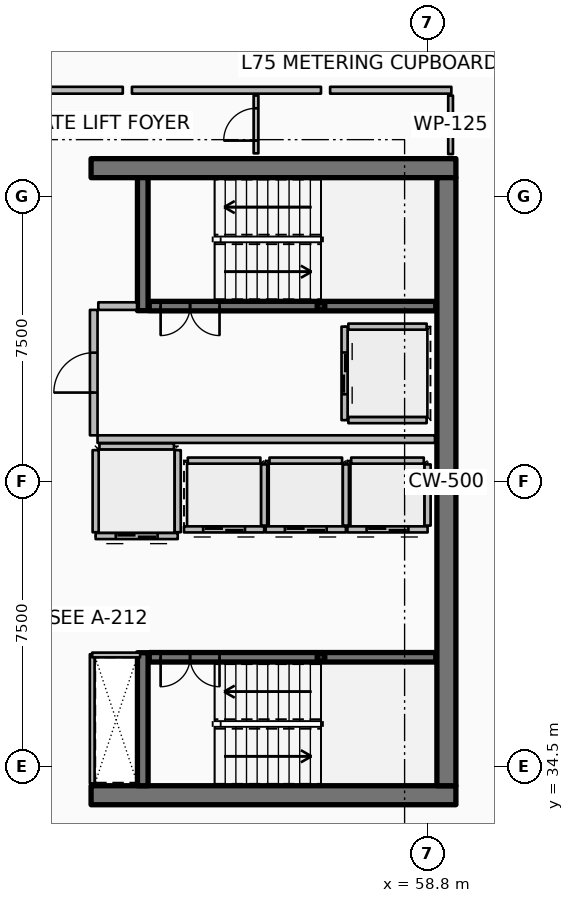
"""IFC4 building model, lengths in metres.
Left out: names, types, materials, properties, quantities, classifications, styles, units other than length and angle.
Written with IfcOpenShell. Run it as: python <this file> out.ifc"""

import sys

from ifc_helpers import new_model, si_unit, direction, frame, frame_2d, origin, origin_2d, place, context, subcontext, project, spatial, rectangle, hollow_rectangle, extrude, element, fill, save


model = new_model("IFC4")
c1 = context("Model", 3, precision=1e-05, world=origin(), true_north=direction((0.0, 1.0)))
c2 = subcontext(c1, "Body", "Model", "MODEL_VIEW")
j1 = project(units=[si_unit("LENGTHUNIT", "METRE"), si_unit("PLANEANGLEUNIT", "RADIAN")], contexts=[c1])
p1 = place(None, origin())
s1 = spatial("IfcSite", under=j1, at=p1, CompositionType="ELEMENT")
p2 = place(p1, origin())
s2 = spatial("IfcBuilding", under=s1, at=p2, CompositionType="ELEMENT")
p3 = place(p2, frame((0.0, 0.0, 298.3)))
s3 = spatial("IfcBuildingStorey", under=s2, at=p3, CompositionType="ELEMENT", Elevation=298.3)
for number, where, z_axis, x_axis in (
    (1, (49.95, 33.75, 0.0), (0.0, 0.0, 1.0), (1.0, 0.0, 0.0)),
    (2, (49.95, 50.25, 0.0), (0.0, 0.0, 1.0), (1.0, 0.0, 0.0)),
):
    element("IfcWall", number, at=place(p3, frame(where, z_axis=z_axis, x_axis=x_axis)), inside=s3, PredefinedType="SHEAR", context=c2, shape_type="SweptSolid", body=[
        extrude(rectangle(XDim=9.6, YDim=0.5, at=frame_2d((4.8, 0.0))), origin(), (0.0, 0.0, 1.0), 3.85),
    ])
p4 = place(p3, frame((59.3, 34.0, 0.0), z_axis=(0.0, 0.0, 1.0), x_axis=(0.0, 1.0, 0.0)))
e3 = element("IfcWall", 3, at=p4, inside=s3, PredefinedType="SHEAR", context=c2, shape_type="SweptSolid", body=[
    extrude(rectangle(XDim=16.0, YDim=0.5, at=frame_2d((8.0, 0.0))), origin(), (0.0, 0.0, 1.0), 3.85),
])
for number, where, z_axis, x_axis in (
    (4, (51.31, 46.5, 0.0), (0.0, 0.0, 1.0), (0.0, 1.0, 0.0)),
    (5, (51.31, 34.0, 0.0), (0.0, 0.0, 1.0), (0.0, 1.0, 0.0)),
):
    element("IfcWall", number, at=place(p3, frame(where, z_axis=z_axis, x_axis=x_axis)), inside=s3, PredefinedType="SHEAR", context=c2, shape_type="SweptSolid", body=[
        extrude(rectangle(XDim=3.5, YDim=0.28, at=frame_2d((1.75, 0.0))), origin(), (0.0, 0.0, 1.0), 3.85),
    ])
for number, where, z_axis, x_axis in (
    (6, (56.0, 46.62, 0.0), (0.0, 0.0, 1.0), (1.0, 0.0, 0.0)),
    (7, (56.0, 37.38, 0.0), (0.0, 0.0, 1.0), (1.0, 0.0, 0.0)),
):
    element("IfcColumn", number, at=place(p3, frame(where, z_axis=z_axis, x_axis=x_axis)), inside=s3, PredefinedType="COLUMN", context=c2, shape_type="SweptSolid", body=[
        extrude(hollow_rectangle(XDim=0.2, YDim=0.2, WallThickness=0.01, InnerFilletRadius=0.01, OuterFilletRadius=0.02, at=origin_2d()), origin(), (0.0, 0.0, 1.0), 1.72),
    ])
p5 = place(p3, frame((51.48, 46.62, 0.0), z_axis=(0.0, 0.0, 1.0), x_axis=(1.0, 0.0, 0.0)))
e8 = element("IfcWall", 8, at=p5, inside=s3, PredefinedType="SOLIDWALL", context=c2, shape_type="SweptSolid", body=[
    extrude(rectangle(XDim=7.54, YDim=0.25, at=frame_2d((3.77, 0.0))), origin(), (0.0, 0.0, 1.0), 3.59),
])
p6 = place(p5, frame((0.3, 0.0, 0.0)))
e9 = element("IfcOpeningElement", 9, at=p6, cuts=e8, PredefinedType="OPENING", context=c2, shape_type="SweptSolid", body=[
    extrude(rectangle(XDim=1.55, YDim=2.15, at=frame_2d((0.775, 1.075))), frame((0.0, 0.135, 0.0), z_axis=(0.0, -1.0, 0.0), x_axis=(1.0, 0.0, 0.0)), (0.0, 0.0, 1.0), 0.27),
])
p7 = place(p3, frame((51.48, 37.38, 0.0), z_axis=(0.0, 0.0, 1.0), x_axis=(1.0, 0.0, 0.0)))
e10 = element("IfcWall", 10, at=p7, inside=s3, PredefinedType="SOLIDWALL", context=c2, shape_type="SweptSolid", body=[
    extrude(rectangle(XDim=7.54, YDim=0.25, at=frame_2d((3.77, 0.0))), origin(), (0.0, 0.0, 1.0), 3.59),
])
p8 = place(p7, frame((0.3, 0.0, 0.0)))
e11 = element("IfcOpeningElement", 11, at=p8, cuts=e10, PredefinedType="OPENING", context=c2, shape_type="SweptSolid", body=[
    extrude(rectangle(XDim=1.55, YDim=2.15, at=frame_2d((0.775, 1.075))), frame((0.0, 0.135, 0.0), z_axis=(0.0, -1.0, 0.0), x_axis=(1.0, 0.0, 0.0)), (0.0, 0.0, 1.0), 0.27),
])
p9 = place(p3, frame((54.505, 40.745, 0.0), z_axis=(0.0, 0.0, 1.0), x_axis=(-1.0, 0.0, 0.0)))
e12 = element("IfcWall", 12, at=p9, inside=s3, PredefinedType="PARTITIONING", context=c2, shape_type="SweptSolid", body=[
    extrude(rectangle(XDim=2.11, YDim=0.16, at=frame_2d((1.055, 0.0))), origin(), (0.0, 0.0, 1.0), 3.59),
])
p10 = place(p9, frame((0.505, 0.0, 0.0)))
e13 = element("IfcOpeningElement", 13, at=p10, cuts=e12, PredefinedType="OPENING", context=c2, shape_type="SweptSolid", body=[
    extrude(rectangle(XDim=1.1, YDim=2.1, at=frame_2d((0.55, 1.05))), frame((0.0, 0.09, 0.0), z_axis=(0.0, -1.0, 0.0), x_axis=(1.0, 0.0, 0.0)), (0.0, 0.0, 1.0), 0.18),
])
p11 = place(p3, frame((54.505, 40.845, 0.0), z_axis=(0.0, 0.0, 1.0), x_axis=(0.0, 1.0, 0.0)))
e14 = element("IfcWall", 14, at=p11, inside=s3, PredefinedType="PARTITIONING", context=c2, shape_type="SweptSolid", body=[
    extrude(rectangle(XDim=1.61, YDim=0.16, at=frame_2d((0.805, 0.0))), origin(), (0.0, 0.0, 1.0), 3.59),
])
p12 = place(p3, frame((52.495, 42.555, 0.0), z_axis=(0.0, 0.0, 1.0), x_axis=(1.0, 0.0, 0.0)))
e15 = element("IfcWall", 15, at=p12, inside=s3, PredefinedType="PARTITIONING", context=c2, shape_type="SweptSolid", body=[
    extrude(rectangle(XDim=1.91, YDim=0.16, at=frame_2d((0.955, 0.0))), origin(), (0.0, 0.0, 1.0), 3.59),
])
p13 = place(p3, frame((56.655, 40.745, 0.0), z_axis=(0.0, 0.0, 1.0), x_axis=(-1.0, 0.0, 0.0)))
e16 = element("IfcWall", 16, at=p13, inside=s3, PredefinedType="PARTITIONING", context=c2, shape_type="SweptSolid", body=[
    extrude(rectangle(XDim=2.11, YDim=0.16, at=frame_2d((1.055, 0.0))), origin(), (0.0, 0.0, 1.0), 3.59),
])
p14 = place(p13, frame((0.505, 0.0, 0.0)))
e17 = element("IfcOpeningElement", 17, at=p14, cuts=e16, PredefinedType="OPENING", context=c2, shape_type="SweptSolid", body=[
    extrude(rectangle(XDim=1.1, YDim=2.1, at=frame_2d((0.55, 1.05))), frame((0.0, 0.09, 0.0), z_axis=(0.0, -1.0, 0.0), x_axis=(1.0, 0.0, 0.0)), (0.0, 0.0, 1.0), 0.18),
])
p15 = place(p3, frame((56.655, 40.845, 0.0), z_axis=(0.0, 0.0, 1.0), x_axis=(0.0, 1.0, 0.0)))
e18 = element("IfcWall", 18, at=p15, inside=s3, PredefinedType="PARTITIONING", context=c2, shape_type="SweptSolid", body=[
    extrude(rectangle(XDim=1.61, YDim=0.16, at=frame_2d((0.805, 0.0))), origin(), (0.0, 0.0, 1.0), 3.59),
])
p16 = place(p3, frame((54.645, 42.555, 0.0), z_axis=(0.0, 0.0, 1.0), x_axis=(1.0, 0.0, 0.0)))
e19 = element("IfcWall", 19, at=p16, inside=s3, PredefinedType="PARTITIONING", context=c2, shape_type="SweptSolid", body=[
    extrude(rectangle(XDim=1.91, YDim=0.16, at=frame_2d((0.955, 0.0))), origin(), (0.0, 0.0, 1.0), 3.59),
])
p17 = place(p3, frame((58.805, 40.745, 0.0), z_axis=(0.0, 0.0, 1.0), x_axis=(-1.0, 0.0, 0.0)))
e20 = element("IfcWall", 20, at=p17, inside=s3, PredefinedType="PARTITIONING", context=c2, shape_type="SweptSolid", body=[
    extrude(rectangle(XDim=2.11, YDim=0.16, at=frame_2d((1.055, 0.0))), origin(), (0.0, 0.0, 1.0), 3.59),
])
p18 = place(p17, frame((0.505, 0.0, 0.0)))
e21 = element("IfcOpeningElement", 21, at=p18, cuts=e20, PredefinedType="OPENING", context=c2, shape_type="SweptSolid", body=[
    extrude(rectangle(XDim=1.1, YDim=2.1, at=frame_2d((0.55, 1.05))), frame((0.0, 0.09, 0.0), z_axis=(0.0, -1.0, 0.0), x_axis=(1.0, 0.0, 0.0)), (0.0, 0.0, 1.0), 0.18),
])
p19 = place(p3, frame((58.805, 40.845, 0.0), z_axis=(0.0, 0.0, 1.0), x_axis=(0.0, 1.0, 0.0)))
e22 = element("IfcWall", 22, at=p19, inside=s3, PredefinedType="PARTITIONING", context=c2, shape_type="SweptSolid", body=[
    extrude(rectangle(XDim=1.61, YDim=0.16, at=frame_2d((0.805, 0.0))), origin(), (0.0, 0.0, 1.0), 3.59),
])
p20 = place(p3, frame((56.795, 42.555, 0.0), z_axis=(0.0, 0.0, 1.0), x_axis=(1.0, 0.0, 0.0)))
e23 = element("IfcWall", 23, at=p20, inside=s3, PredefinedType="PARTITIONING", context=c2, shape_type="SweptSolid", body=[
    extrude(rectangle(XDim=1.91, YDim=0.16, at=frame_2d((0.955, 0.0))), origin(), (0.0, 0.0, 1.0), 3.59),
])
p21 = place(p3, frame((56.62, 46.08, 0.0), z_axis=(0.0, 0.0, 1.0), x_axis=(0.0, -1.0, 0.0)))
e24 = element("IfcWall", 24, at=p21, inside=s3, PredefinedType="PARTITIONING", context=c2, shape_type="SweptSolid", body=[
    extrude(rectangle(XDim=2.46, YDim=0.16, at=frame_2d((1.23, 0.0))), origin(), (0.0, 0.0, 1.0), 3.59),
])
p22 = place(p21, frame((0.68, 0.0, 0.0)))
e25 = element("IfcOpeningElement", 25, at=p22, cuts=e24, PredefinedType="OPENING", context=c2, shape_type="SweptSolid", body=[
    extrude(rectangle(XDim=1.1, YDim=2.1, at=frame_2d((0.55, 1.05))), frame((0.0, 0.09, 0.0), z_axis=(0.0, -1.0, 0.0), x_axis=(1.0, 0.0, 0.0)), (0.0, 0.0, 1.0), 0.18),
])
for number, where, z_axis, x_axis in (
    (26, (56.72, 46.08, 0.0), (0.0, 0.0, 1.0), (1.0, 0.0, 0.0)),
    (27, (56.72, 43.62, 0.0), (0.0, 0.0, 1.0), (1.0, 0.0, 0.0)),
):
    element("IfcWall", number, at=place(p3, frame(where, z_axis=z_axis, x_axis=x_axis)), inside=s3, PredefinedType="PARTITIONING", context=c2, shape_type="SweptSolid", body=[
        extrude(rectangle(XDim=2.06, YDim=0.16, at=frame_2d((1.03, 0.0))), origin(), (0.0, 0.0, 1.0), 3.59),
    ])
p23 = place(p3, frame((52.23, 40.57, 0.0), z_axis=(0.0, 0.0, 1.0), x_axis=(-1.0, 0.0, 0.0)))
e28 = element("IfcWall", 28, at=p23, inside=s3, PredefinedType="PARTITIONING", context=c2, shape_type="SweptSolid", body=[
    extrude(rectangle(XDim=2.16, YDim=0.16, at=frame_2d((1.08, 0.0))), origin(), (0.0, 0.0, 1.0), 3.59),
])
p24 = place(p23, frame((0.53, 0.0, 0.0)))
e29 = element("IfcOpeningElement", 29, at=p24, cuts=e28, PredefinedType="OPENING", context=c2, shape_type="SweptSolid", body=[
    extrude(rectangle(XDim=1.1, YDim=2.1, at=frame_2d((0.55, 1.05))), frame((0.0, 0.09, 0.0), z_axis=(0.0, -1.0, 0.0), x_axis=(1.0, 0.0, 0.0)), (0.0, 0.0, 1.0), 0.18),
])
for number, where, z_axis, x_axis in (
    (30, (52.23, 40.67, 0.0), (0.0, 0.0, 1.0), (0.0, 1.0, 0.0)),
    (31, (50.07, 40.67, 0.0), (0.0, 0.0, 1.0), (0.0, 1.0, 0.0)),
):
    element("IfcWall", number, at=place(p3, frame(where, z_axis=z_axis, x_axis=x_axis)), inside=s3, PredefinedType="PARTITIONING", context=c2, shape_type="SweptSolid", body=[
        extrude(rectangle(XDim=2.16, YDim=0.16, at=frame_2d((1.08, 0.0))), origin(), (0.0, 0.0, 1.0), 3.59),
    ])
p25 = place(p3, frame((50.17, 42.93, 0.0), z_axis=(0.0, 0.0, 1.0), x_axis=(1.0, 0.0, 0.0)))
e32 = element("IfcWall", 32, at=p25, inside=s3, PredefinedType="PARTITIONING", context=c2, shape_type="SweptSolid", body=[
    extrude(rectangle(XDim=1.96, YDim=0.16, at=frame_2d((0.98, 0.0))), origin(), (0.0, 0.0, 1.0), 3.59),
])
p26 = place(p3, frame((50.12, 43.12, 0.0), z_axis=(0.0, 0.0, 1.0), x_axis=(1.0, 0.0, 0.0)))
e33 = element("IfcWall", 33, at=p26, inside=s3, PredefinedType="PARTITIONING", context=c2, shape_type="SweptSolid", body=[
    extrude(rectangle(XDim=8.88, YDim=0.2, at=frame_2d((4.44, 0.0))), origin(), (0.0, 0.0, 1.0), 3.59),
])
p27 = place(p3, frame((50.14, 46.62, 0.0), z_axis=(0.0, 0.0, 1.0), x_axis=(1.0, 0.0, 0.0)))
e34 = element("IfcWall", 34, at=p27, inside=s3, PredefinedType="PARTITIONING", context=c2, shape_type="SweptSolid", body=[
    extrude(rectangle(XDim=1.02, YDim=0.2, at=frame_2d((0.51, 0.0))), origin(), (0.0, 0.0, 1.0), 3.59),
])
p28 = place(p3, frame((50.02, 43.22, 0.0), z_axis=(0.0, 0.0, 1.0), x_axis=(0.0, 1.0, 0.0)))
e35 = element("IfcWall", 35, at=p28, inside=s3, PredefinedType="PARTITIONING", context=c2, shape_type="SweptSolid", body=[
    extrude(rectangle(XDim=3.3, YDim=0.2, at=frame_2d((1.65, 0.0))), origin(), (0.0, 0.0, 1.0), 3.59),
])
p29 = place(p28, frame((1.125, 0.0, 0.0)))
e36 = element("IfcOpeningElement", 36, at=p29, cuts=e35, PredefinedType="OPENING", context=c2, shape_type="SweptSolid", body=[
    extrude(rectangle(XDim=1.05, YDim=2.1, at=frame_2d((0.525, 1.05))), frame((0.0, 0.11, 0.0), z_axis=(0.0, -1.0, 0.0), x_axis=(1.0, 0.0, 0.0)), (0.0, 0.0, 1.0), 0.22),
])
p30 = place(p3, frame((49.98, 34.06, 0.0), z_axis=(0.0, 0.0, 1.0), x_axis=(0.0, 1.0, 0.0)))
e37 = element("IfcWall", 37, at=p30, inside=s3, PredefinedType="PARTITIONING", context=c2, shape_type="SweptSolid", body=[
    extrude(rectangle(XDim=3.4, YDim=0.125, at=frame_2d((1.7, 0.0))), origin(), (0.0, 0.0, 1.0), 3.03),
])
p31 = place(p3, frame((49.98, 37.44, 0.0), z_axis=(0.0, 0.0, 1.0), x_axis=(1.0, 0.0, 0.0)))
e38 = element("IfcWall", 38, at=p31, inside=s3, PredefinedType="PARTITIONING", context=c2, shape_type="SweptSolid", body=[
    extrude(rectangle(XDim=1.26, YDim=0.125, at=frame_2d((0.63, 0.0))), origin(), (0.0, 0.0, 1.0), 3.03),
])
p32 = place(p3, frame((59.41, 50.62, 0.0), z_axis=(0.0, 0.0, 1.0), x_axis=(0.0, 1.0, 0.0)))
e39 = element("IfcWall", 39, at=p32, inside=s3, PredefinedType="PARTITIONING", context=c2, shape_type="SweptSolid", body=[
    extrude(rectangle(XDim=1.54, YDim=0.125, at=frame_2d((0.77, 0.0))), origin(), (0.0, 0.0, 1.0), 3.03),
])
p33 = place(p3, frame((54.29, 50.64, 0.0), z_axis=(0.0, 0.0, 1.0), x_axis=(0.0, 1.0, 0.0)))
e40 = element("IfcWall", 40, at=p33, inside=s3, PredefinedType="PARTITIONING", context=c2, shape_type="SweptSolid", body=[
    extrude(rectangle(XDim=1.52, YDim=0.125, at=frame_2d((0.76, 0.0))), origin(), (0.0, 0.0, 1.0), 3.03),
])
p34 = place(p33, frame((0.335, 0.0, 0.0)))
e41 = element("IfcOpeningElement", 41, at=p34, cuts=e40, PredefinedType="OPENING", context=c2, shape_type="SweptSolid", body=[
    extrude(rectangle(XDim=0.85, YDim=2.06, at=frame_2d((0.425, 1.03))), frame((0.0, 0.073, 0.0), z_axis=(0.0, -1.0, 0.0), x_axis=(1.0, 0.0, 0.0)), (0.0, 0.0, 1.0), 0.145),
])
p35 = place(p3, frame((59.43, 52.3, 0.0), z_axis=(0.0, 0.0, 1.0), x_axis=(-1.0, 0.0, 0.0)))
e42 = element("IfcWall", 42, at=p35, inside=s3, PredefinedType="PARTITIONING", context=c2, shape_type="SweptSolid", body=[
    extrude(rectangle(XDim=3.19, YDim=0.18, at=frame_2d((1.595, 0.0))), origin(), (0.0, 0.0, 1.0), 2.957),
])
p36 = place(p3, frame((62.579, 52.938, 0.0), z_axis=(0.0, 0.0, 1.0), x_axis=(-0.697017998251, 0.717053631268, 0.0)))
e43 = element("IfcWall", 43, at=p36, inside=s3, PredefinedType="PARTITIONING", context=c2, shape_type="SweptSolid", body=[
    extrude(rectangle(XDim=4.618, YDim=0.125, at=frame_2d((2.309, 0.0))), origin(), (0.0, 0.0, 1.0), 2.957),
])
p37 = place(p36, frame((1.859, 0.0, 0.0)))
e44 = element("IfcOpeningElement", 44, at=p37, cuts=e43, PredefinedType="OPENING", context=c2, shape_type="SweptSolid", body=[
    extrude(rectangle(XDim=0.9, YDim=2.08, at=frame_2d((0.45, 1.04))), frame((0.0, 0.073, 0.0), z_axis=(0.0, -1.0, 0.0), x_axis=(1.0, 0.0, 0.0)), (0.0, 0.0, 1.0), 0.145),
])
p38 = place(p3, frame((56.0, 52.3, 0.0), z_axis=(0.0, 0.0, 1.0), x_axis=(-1.0, 0.0, 0.0)))
e45 = element("IfcWall", 45, at=p38, inside=s3, PredefinedType="PARTITIONING", context=c2, shape_type="SweptSolid", body=[
    extrude(rectangle(XDim=4.975, YDim=0.18, at=frame_2d((2.488, 0.0))), origin(), (0.0, 0.0, 1.0), 2.957),
])
p39 = place(p3, frame((50.785, 52.3, 0.0), z_axis=(0.0, 0.0, 1.0), x_axis=(-1.0, 0.0, 0.0)))
e46 = element("IfcWall", 46, at=p39, inside=s3, PredefinedType="PARTITIONING", context=c2, shape_type="SweptSolid", body=[
    extrude(rectangle(XDim=3.884, YDim=0.18, at=frame_2d((1.942, 0.0))), origin(), (0.0, 0.0, 1.0), 2.957),
])
p40 = place(p6, origin())
e47 = element("IfcDoor", 47, at=p40, inside=s3, OperationType="DOUBLE_DOOR_SINGLE_SWING", PredefinedType="DOOR", context=c2, shape_type="SweptSolid", body=[
    extrude(rectangle(XDim=1.55, YDim=2.15, at=frame_2d((0.775, 1.075))), frame((0.0, 0.025, 0.0), z_axis=(0.0, -1.0, 0.0), x_axis=(1.0, 0.0, 0.0)), (0.0, 0.0, 1.0), 0.05),
])
fill(e9, e47)
p41 = place(p8, origin())
e48 = element("IfcDoor", 48, at=p41, inside=s3, OperationType="DOUBLE_DOOR_SINGLE_SWING", PredefinedType="DOOR", context=c2, shape_type="SweptSolid", body=[
    extrude(rectangle(XDim=1.55, YDim=2.15, at=frame_2d((0.775, 1.075))), frame((0.0, 0.025, 0.0), z_axis=(0.0, -1.0, 0.0), x_axis=(1.0, 0.0, 0.0)), (0.0, 0.0, 1.0), 0.05),
])
fill(e11, e48)
p42 = place(p10, origin())
e49 = element("IfcDoor", 49, at=p42, inside=s3, OperationType="DOUBLE_DOOR_SLIDING", PredefinedType="DOOR", context=c2, shape_type="SweptSolid", body=[
    extrude(rectangle(XDim=1.1, YDim=2.1, at=frame_2d((0.55, 1.05))), frame((0.0, 0.025, 0.0), z_axis=(0.0, -1.0, 0.0), x_axis=(1.0, 0.0, 0.0)), (0.0, 0.0, 1.0), 0.05),
])
fill(e13, e49)
p43 = place(p14, origin())
e50 = element("IfcDoor", 50, at=p43, inside=s3, OperationType="DOUBLE_DOOR_SLIDING", PredefinedType="DOOR", context=c2, shape_type="SweptSolid", body=[
    extrude(rectangle(XDim=1.1, YDim=2.1, at=frame_2d((0.55, 1.05))), frame((0.0, 0.025, 0.0), z_axis=(0.0, -1.0, 0.0), x_axis=(1.0, 0.0, 0.0)), (0.0, 0.0, 1.0), 0.05),
])
fill(e17, e50)
p44 = place(p18, origin())
e51 = element("IfcDoor", 51, at=p44, inside=s3, OperationType="DOUBLE_DOOR_SLIDING", PredefinedType="DOOR", context=c2, shape_type="SweptSolid", body=[
    extrude(rectangle(XDim=1.1, YDim=2.1, at=frame_2d((0.55, 1.05))), frame((0.0, 0.025, 0.0), z_axis=(0.0, -1.0, 0.0), x_axis=(1.0, 0.0, 0.0)), (0.0, 0.0, 1.0), 0.05),
])
fill(e21, e51)
p45 = place(p22, origin())
e52 = element("IfcDoor", 52, at=p45, inside=s3, OperationType="DOUBLE_DOOR_SLIDING", PredefinedType="DOOR", context=c2, shape_type="SweptSolid", body=[
    extrude(rectangle(XDim=1.1, YDim=2.1, at=frame_2d((0.55, 1.05))), frame((0.0, 0.025, 0.0), z_axis=(0.0, -1.0, 0.0), x_axis=(1.0, 0.0, 0.0)), (0.0, 0.0, 1.0), 0.05),
])
fill(e25, e52)
p46 = place(p24, origin())
e53 = element("IfcDoor", 53, at=p46, inside=s3, OperationType="DOUBLE_DOOR_SLIDING", PredefinedType="DOOR", context=c2, shape_type="SweptSolid", body=[
    extrude(rectangle(XDim=1.1, YDim=2.1, at=frame_2d((0.55, 1.05))), frame((0.0, 0.025, 0.0), z_axis=(0.0, -1.0, 0.0), x_axis=(1.0, 0.0, 0.0)), (0.0, 0.0, 1.0), 0.05),
])
fill(e29, e53)
p47 = place(p29, origin())
e54 = element("IfcDoor", 54, at=p47, inside=s3, OperationType="SINGLE_SWING_LEFT", PredefinedType="DOOR", context=c2, shape_type="SweptSolid", body=[
    extrude(rectangle(XDim=1.05, YDim=2.1, at=frame_2d((0.525, 1.05))), frame((0.0, 0.025, 0.0), z_axis=(0.0, -1.0, 0.0), x_axis=(1.0, 0.0, 0.0)), (0.0, 0.0, 1.0), 0.05),
])
fill(e36, e54)
p48 = place(p34, origin())
e55 = element("IfcDoor", 55, at=p48, inside=s3, OperationType="SINGLE_SWING_LEFT", PredefinedType="DOOR", context=c2, shape_type="SweptSolid", body=[
    extrude(rectangle(XDim=0.85, YDim=2.06, at=frame_2d((0.425, 1.03))), frame((0.0, 0.025, 0.0), z_axis=(0.0, -1.0, 0.0), x_axis=(1.0, 0.0, 0.0)), (0.0, 0.0, 1.0), 0.05),
])
fill(e41, e55)
save(model, sys.argv[1])
